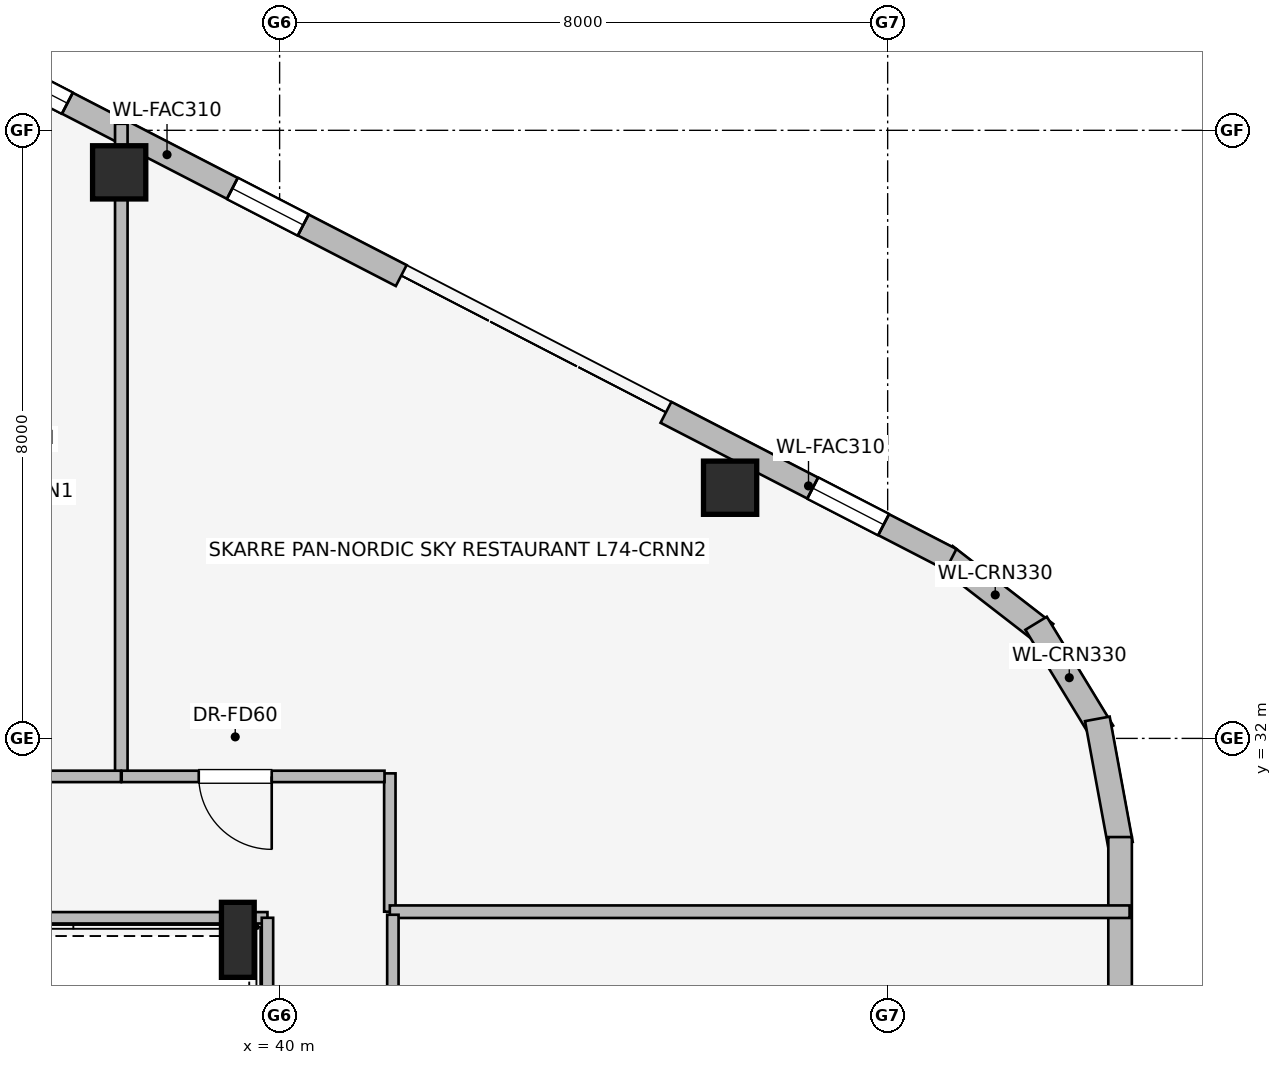
"""IFC4 building model, lengths in metres.
Left out: names, types, materials, properties, quantities, classifications, styles, units other than length and angle.
Written with IfcOpenShell. Run it as: python <this file> out.ifc"""

import sys

from ifc_helpers import new_model, si_unit, direction, frame, frame_2d, origin, origin_2d, place, context, subcontext, project, spatial, rectangle, i_section, extrude, element, fill, save


model = new_model("IFC4")
c1 = context("Model", 3, precision=1e-05, world=origin(), true_north=direction((0.0, 1.0)))
c2 = subcontext(c1, "Body", "Model", "MODEL_VIEW")
j1 = project(units=[si_unit("LENGTHUNIT", "METRE"), si_unit("PLANEANGLEUNIT", "RADIAN")], contexts=[c1])
p1 = place(None, origin())
s1 = spatial("IfcSite", under=j1, at=p1, CompositionType="ELEMENT")
p2 = place(p1, origin())
s2 = spatial("IfcBuilding", under=s1, at=p2, CompositionType="ELEMENT")
p3 = place(p2, frame((0.0, 0.0, 270.3)))
s3 = spatial("IfcBuildingStorey", under=s2, at=p3, CompositionType="ELEMENT", Elevation=270.3)
for number, where, z_axis, x_axis in (
    (1, (45.927, 35.298, 0.0), (0.0, 0.0, 1.0), (1.0, 0.0, 0.0)),
    (2, (37.889, 39.447, 0.0), (0.0, 0.0, 1.0), (1.0, 0.0, 0.0)),
):
    element("IfcColumn", number, at=place(p3, frame(where, z_axis=z_axis, x_axis=x_axis)), inside=s3, PredefinedType="COLUMN", context=c2, shape_type="SweptSolid", body=[
        extrude(rectangle(XDim=0.7, YDim=0.7, at=origin_2d()), origin(), (0.0, 0.0, 1.0), 4.8),
    ])
p4 = place(p3, frame((39.45, 29.35, 0.0), z_axis=(0.0, 0.0, 1.0), x_axis=(1.0, 0.0, 0.0)))
e3 = element("IfcColumn", 3, at=p4, inside=s3, PredefinedType="COLUMN", context=c2, shape_type="SweptSolid", body=[
    extrude(i_section(OverallWidth=0.431, OverallDepth=0.987, WebThickness=0.034, FlangeThickness=0.062, at=origin_2d()), origin(), (0.0, 0.0, 1.0), 4.8),
])
p5 = place(p3, frame((48.753, 34.401, 0.0), z_axis=(0.0, 0.0, 1.0), x_axis=(0.790691856293, -0.61221433207, 0.0)))
e4 = element("IfcWall", 4, at=p5, inside=s3, PredefinedType="STANDARD", context=c2, shape_type="SweptSolid", body=[
    extrude(rectangle(XDim=1.676, YDim=0.33, at=frame_2d((0.838, 0.0))), origin(), (0.0, 0.0, 1.0), 4.49),
])
p6 = place(p3, frame((49.953, 33.515, 0.0), z_axis=(0.0, 0.0, 1.0), x_axis=(0.520325409202, -0.853968072318, 0.0)))
e5 = element("IfcWall", 5, at=p6, inside=s3, PredefinedType="STANDARD", context=c2, shape_type="SweptSolid", body=[
    extrude(rectangle(XDim=1.678, YDim=0.33, at=frame_2d((0.839, 0.0))), origin(), (0.0, 0.0, 1.0), 4.49),
])
p7 = place(p3, frame((50.759, 32.257, 0.0), z_axis=(0.0, 0.0, 1.0), x_axis=(0.180691763044, -0.983539773862, 0.0)))
e6 = element("IfcWall", 6, at=p7, inside=s3, PredefinedType="STANDARD", context=c2, shape_type="SweptSolid", body=[
    extrude(rectangle(XDim=1.677, YDim=0.33, at=frame_2d((0.838, 0.0))), origin(), (0.0, 0.0, 1.0), 4.49),
])
p8 = place(p3, frame((35.437, 41.27, 0.0), z_axis=(0.0, 0.0, 1.0), x_axis=(0.888622971019, -0.458638436437, 0.0)))
e7 = element("IfcWall", 7, at=p8, inside=s3, PredefinedType="STANDARD", context=c2, shape_type="SweptSolid", body=[
    extrude(rectangle(XDim=6.936, YDim=0.31, at=frame_2d((3.468, 0.0))), origin(), (0.0, 0.0, 1.0), 4.49),
])
p9 = place(p8, frame((0.942, 0.0, 0.75)))
e8 = element("IfcOpeningElement", 8, at=p9, cuts=e7, PredefinedType="OPENING", context=c2, shape_type="SweptSolid", body=[
    extrude(rectangle(XDim=1.05, YDim=1.4, at=frame_2d((0.525, 0.7))), frame((0.0, 0.165, 0.0), z_axis=(0.0, -1.0, 0.0), x_axis=(1.0, 0.0, 0.0)), (0.0, 0.0, 1.0), 0.33),
])
p10 = place(p8, frame((4.435, 0.0, 0.75)))
e9 = element("IfcOpeningElement", 9, at=p10, cuts=e7, PredefinedType="OPENING", context=c2, shape_type="SweptSolid", body=[
    extrude(rectangle(XDim=1.05, YDim=1.4, at=frame_2d((0.525, 0.7))), frame((0.0, 0.165, 0.0), z_axis=(0.0, -1.0, 0.0), x_axis=(1.0, 0.0, 0.0)), (0.0, 0.0, 1.0), 0.33),
])
p11 = place(p3, frame((45.083, 36.29, 0.0), z_axis=(0.0, 0.0, 1.0), x_axis=(0.888616094641, -0.45865175934, 0.0)))
e10 = element("IfcWall", 10, at=p11, inside=s3, PredefinedType="STANDARD", context=c2, shape_type="SweptSolid", body=[
    extrude(rectangle(XDim=4.221, YDim=0.31, at=frame_2d((2.111, 0.0))), origin(), (0.0, 0.0, 1.0), 4.49),
])
p12 = place(p11, frame((2.173, 0.0, 0.75)))
e11 = element("IfcOpeningElement", 11, at=p12, cuts=e10, PredefinedType="OPENING", context=c2, shape_type="SweptSolid", body=[
    extrude(rectangle(XDim=1.05, YDim=1.4, at=frame_2d((0.525, 0.7))), frame((0.0, 0.165, 0.0), z_axis=(0.0, -1.0, 0.0), x_axis=(1.0, 0.0, 0.0)), (0.0, 0.0, 1.0), 0.33),
])
p13 = place(p3, frame((51.058, 30.702, 0.0), z_axis=(0.0, 0.0, 1.0), x_axis=(0.0, -1.0, 0.0)))
e12 = element("IfcWall", 12, at=p13, inside=s3, PredefinedType="STANDARD", context=c2, shape_type="SweptSolid", body=[
    extrude(rectangle(XDim=6.166, YDim=0.31, at=frame_2d((3.083, 0.0))), origin(), (0.0, 0.0, 1.0), 4.49),
])
p14 = place(p13, frame((3.884, 0.0, 0.75)))
e13 = element("IfcOpeningElement", 13, at=p14, cuts=e12, PredefinedType="OPENING", context=c2, shape_type="SweptSolid", body=[
    extrude(rectangle(XDim=1.05, YDim=1.4, at=frame_2d((0.525, 0.7))), frame((0.0, 0.165, 0.0), z_axis=(0.0, -1.0, 0.0), x_axis=(1.0, 0.0, 0.0)), (0.0, 0.0, 1.0), 0.33),
])
p15 = place(p3, frame((39.84, 29.64, 0.0), z_axis=(0.0, 0.0, 1.0), x_axis=(-1.0, 0.0, 0.0)))
e14 = element("IfcWall", 14, at=p15, inside=s3, PredefinedType="PARTITIONING", context=c2, shape_type="SweptSolid", body=[
    extrude(rectangle(XDim=12.203, YDim=0.15, at=frame_2d((6.102, 0.0))), origin(), (0.0, 0.0, 1.0), 3.631),
])
p16 = place(p3, frame((39.84, 18.36, 0.0), z_axis=(0.0, 0.0, 1.0), x_axis=(0.0, 1.0, 0.0)))
e15 = element("IfcWall", 15, at=p16, inside=s3, PredefinedType="PARTITIONING", context=c2, shape_type="SweptSolid", body=[
    extrude(rectangle(XDim=11.28, YDim=0.15, at=frame_2d((5.64, 0.0))), origin(), (0.0, 0.0, 1.0), 4.49),
])
p17 = place(p3, frame((41.45, 29.72, 0.0), z_axis=(0.0, 0.0, 1.0), x_axis=(0.0, 1.0, 0.0)))
e16 = element("IfcWall", 16, at=p17, inside=s3, PredefinedType="PARTITIONING", context=c2, shape_type="SweptSolid", body=[
    extrude(rectangle(XDim=1.82, YDim=0.15, at=frame_2d((0.91, 0.0))), origin(), (0.0, 0.0, 1.0), 4.49),
])
p18 = place(p3, frame((37.917, 31.51, 0.0), z_axis=(0.0, 0.0, 1.0), x_axis=(0.0, 1.0, 0.0)))
e17 = element("IfcWall", 17, at=p18, inside=s3, PredefinedType="PARTITIONING", context=c2, shape_type="SweptSolid", body=[
    extrude(rectangle(XDim=8.576, YDim=0.165, at=frame_2d((4.288, 0.0))), origin(), (0.0, 0.0, 1.0), 3.879),
])
p19 = place(p3, frame((37.912, 31.5, 0.0), z_axis=(0.0, 0.0, 1.0), x_axis=(-1.0, 0.0, 0.0)))
e18 = element("IfcWall", 18, at=p19, inside=s3, PredefinedType="PARTITIONING", context=c2, shape_type="SweptSolid", body=[
    extrude(rectangle(XDim=3.795, YDim=0.15, at=frame_2d((1.897, 0.0))), origin(), (0.0, 0.0, 1.0), 4.49),
])
p20 = place(p19, frame((1.212, 0.0, 0.0)))
e19 = element("IfcOpeningElement", 19, at=p20, cuts=e18, PredefinedType="OPENING", context=c2, shape_type="SweptSolid", body=[
    extrude(rectangle(XDim=0.96, YDim=2.0, at=frame_2d((0.48, 1.0))), frame((0.0, 0.085, 0.0), z_axis=(0.0, -1.0, 0.0), x_axis=(1.0, 0.0, 0.0)), (0.0, 0.0, 1.0), 0.17),
])
p21 = place(p3, frame((41.38, 31.5, 0.0), z_axis=(0.0, 0.0, 1.0), x_axis=(-1.0, 0.0, 0.0)))
e20 = element("IfcWall", 20, at=p21, inside=s3, PredefinedType="PARTITIONING", context=c2, shape_type="SweptSolid", body=[
    extrude(rectangle(XDim=3.458, YDim=0.15, at=frame_2d((1.729, 0.0))), origin(), (0.0, 0.0, 1.0), 4.49),
])
p22 = place(p21, frame((1.484, 0.0, 0.0)))
e21 = element("IfcOpeningElement", 21, at=p22, cuts=e20, PredefinedType="OPENING", context=c2, shape_type="SweptSolid", body=[
    extrude(rectangle(XDim=0.96, YDim=2.0, at=frame_2d((0.48, 1.0))), frame((0.0, 0.085, 0.0), z_axis=(0.0, -1.0, 0.0), x_axis=(1.0, 0.0, 0.0)), (0.0, 0.0, 1.0), 0.17),
])
p23 = place(p3, frame((41.45, 29.72, 0.0), z_axis=(0.0, 0.0, 1.0), x_axis=(1.0, 0.0, 0.0)))
e22 = element("IfcWall", 22, at=p23, inside=s3, PredefinedType="PARTITIONING", context=c2, shape_type="SweptSolid", body=[
    extrude(rectangle(XDim=9.733, YDim=0.165, at=frame_2d((4.867, 0.0))), origin(), (0.0, 0.0, 1.0), 3.824),
])
p24 = place(p3, frame((41.49, 23.791, 0.0), z_axis=(0.0, 0.0, 1.0), x_axis=(0.0, 1.0, 0.0)))
e23 = element("IfcWall", 23, at=p24, inside=s3, PredefinedType="PARTITIONING", context=c2, shape_type="SweptSolid", body=[
    extrude(rectangle(XDim=5.889, YDim=0.15, at=frame_2d((2.944, 0.0))), origin(), (0.0, 0.0, 1.0), 4.49),
])
p25 = place(p24, frame((2.465, 0.0, 0.0)))
e24 = element("IfcOpeningElement", 24, at=p25, cuts=e23, PredefinedType="OPENING", context=c2, shape_type="SweptSolid", body=[
    extrude(rectangle(XDim=0.96, YDim=2.0, at=frame_2d((0.48, 1.0))), frame((0.0, 0.085, 0.0), z_axis=(0.0, -1.0, 0.0), x_axis=(1.0, 0.0, 0.0)), (0.0, 0.0, 1.0), 0.17),
])
p26 = place(p9, origin())
e25 = element("IfcWindow", 25, at=p26, inside=s3, PartitioningType="SINGLE_PANEL", PredefinedType="WINDOW", context=c2, shape_type="SweptSolid", body=[
    extrude(rectangle(XDim=1.05, YDim=1.4, at=frame_2d((0.525, 0.7))), frame((0.0, 0.03, 0.0), z_axis=(0.0, -1.0, 0.0), x_axis=(1.0, 0.0, 0.0)), (0.0, 0.0, 1.0), 0.06),
])
fill(e8, e25)
p27 = place(p10, origin())
e26 = element("IfcWindow", 26, at=p27, inside=s3, PartitioningType="SINGLE_PANEL", PredefinedType="WINDOW", context=c2, shape_type="SweptSolid", body=[
    extrude(rectangle(XDim=1.05, YDim=1.4, at=frame_2d((0.525, 0.7))), frame((0.0, 0.03, 0.0), z_axis=(0.0, -1.0, 0.0), x_axis=(1.0, 0.0, 0.0)), (0.0, 0.0, 1.0), 0.06),
])
fill(e9, e26)
p28 = place(p12, origin())
e27 = element("IfcWindow", 27, at=p28, inside=s3, PartitioningType="SINGLE_PANEL", PredefinedType="WINDOW", context=c2, shape_type="SweptSolid", body=[
    extrude(rectangle(XDim=1.05, YDim=1.4, at=frame_2d((0.525, 0.7))), frame((0.0, 0.03, 0.0), z_axis=(0.0, -1.0, 0.0), x_axis=(1.0, 0.0, 0.0)), (0.0, 0.0, 1.0), 0.06),
])
fill(e11, e27)
p29 = place(p22, origin())
e28 = element("IfcDoor", 28, at=p29, inside=s3, OperationType="SINGLE_SWING_LEFT", PredefinedType="DOOR", context=c2, shape_type="SweptSolid", body=[
    extrude(rectangle(XDim=0.96, YDim=2.0, at=frame_2d((0.48, 1.0))), frame((0.0, 0.025, 0.0), z_axis=(0.0, -1.0, 0.0), x_axis=(1.0, 0.0, 0.0)), (0.0, 0.0, 1.0), 0.05),
])
fill(e21, e28)
save(model, sys.argv[1])
